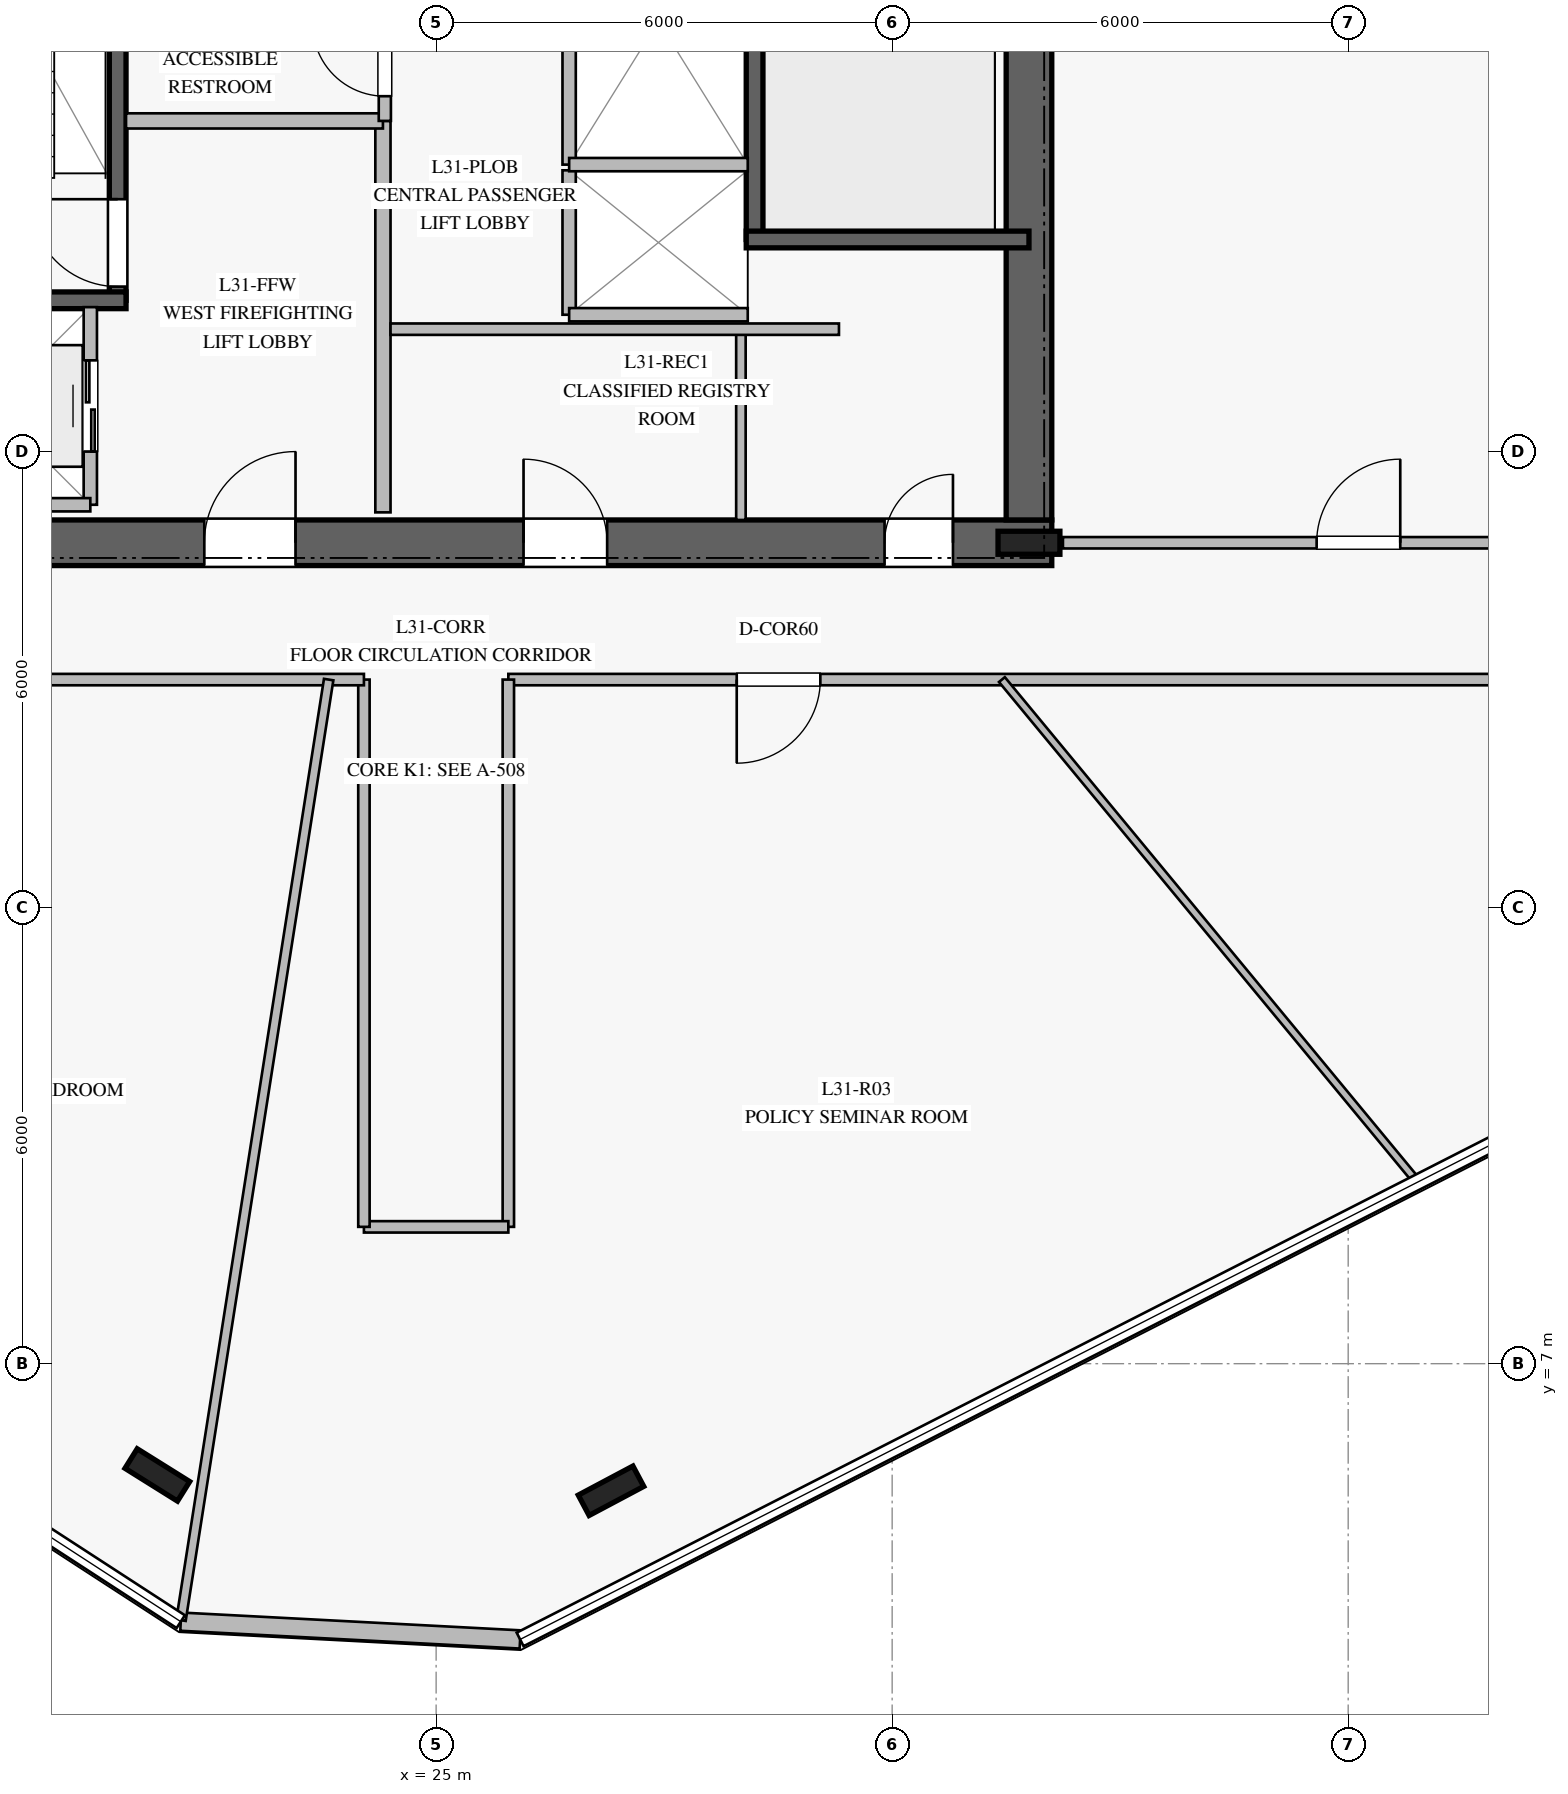
"""IFC4 building model, lengths in metres.
Left out: names, types, materials, properties, quantities, classifications, styles, units other than length and angle.
Written with IfcOpenShell. Run it as: python <this file> out.ifc"""

import sys

from ifc_helpers import new_model, si_unit, direction, frame, frame_2d, origin, origin_2d, place, context, subcontext, project, spatial, rectangle, i_section, extrude, element, fill, save


model = new_model("IFC4")
c1 = context("Model", 3, precision=1e-05, world=origin(), true_north=direction((0.0, 1.0)))
c2 = subcontext(c1, "Body", "Model", "MODEL_VIEW")
j1 = project(units=[si_unit("LENGTHUNIT", "METRE"), si_unit("PLANEANGLEUNIT", "RADIAN")], contexts=[c1])
p1 = place(None, origin())
s1 = spatial("IfcSite", under=j1, at=p1, CompositionType="ELEMENT")
p2 = place(p1, origin())
s2 = spatial("IfcBuilding", under=s1, at=p2, CompositionType="ELEMENT")
p3 = place(p2, frame((0.0, 0.0, 130.4)))
s3 = spatial("IfcBuildingStorey", under=s2, at=p3, CompositionType="ELEMENT", Elevation=130.4)
p4 = place(p3, frame((16.9, 17.8, 0.0), z_axis=(0.0, 0.0, 1.0), x_axis=(1.0, 0.0, 0.0)))
e1 = element("IfcWall", 1, at=p4, inside=s3, PredefinedType="SHEAR", context=c2, shape_type="SweptSolid", body=[
    extrude(rectangle(XDim=16.2, YDim=0.6, at=frame_2d((8.1, 0.0))), origin(), (0.0, 0.0, 1.0), 3.76),
])
p5 = place(p4, frame((5.05, 0.0, 0.0)))
e2 = element("IfcOpeningElement", 2, at=p5, cuts=e1, PredefinedType="OPENING", context=c2, shape_type="SweptSolid", body=[
    extrude(rectangle(XDim=1.2, YDim=2.25, at=frame_2d((0.6, 1.125))), frame((0.0, 0.31, 0.0), z_axis=(0.0, -1.0, 0.0), x_axis=(1.0, 0.0, 0.0)), (0.0, 0.0, 1.0), 0.62),
])
p6 = place(p4, frame((14.0, 0.0, 0.0)))
e3 = element("IfcOpeningElement", 3, at=p6, cuts=e1, PredefinedType="OPENING", context=c2, shape_type="SweptSolid", body=[
    extrude(rectangle(XDim=0.9, YDim=2.1, at=frame_2d((0.45, 1.05))), frame((0.0, 0.31, 0.0), z_axis=(0.0, -1.0, 0.0), x_axis=(1.0, 0.0, 0.0)), (0.0, 0.0, 1.0), 0.62),
])
p7 = place(p4, frame((9.25, 0.0, 0.0)))
e4 = element("IfcOpeningElement", 4, at=p7, cuts=e1, PredefinedType="OPENING", context=c2, shape_type="SweptSolid", body=[
    extrude(rectangle(XDim=1.1, YDim=2.2, at=frame_2d((0.55, 1.1))), frame((0.0, 0.31, 0.0), z_axis=(0.0, -1.0, 0.0), x_axis=(1.0, 0.0, 0.0)), (0.0, 0.0, 1.0), 0.62),
])
p8 = place(p3, frame((32.8, 18.1, 0.0), z_axis=(0.0, 0.0, 1.0), x_axis=(0.0, 1.0, 0.0)))
e5 = element("IfcWall", 5, at=p8, inside=s3, PredefinedType="SHEAR", context=c2, shape_type="SweptSolid", body=[
    extrude(rectangle(XDim=13.8, YDim=0.6, at=frame_2d((6.9, 0.0))), origin(), (0.0, 0.0, 1.0), 3.76),
])
p9 = place(p3, frame((32.8, 17.8, 0.0), z_axis=(0.0, 0.0, 1.0), x_axis=(1.0, 0.0, 0.0)))
e6 = element("IfcColumn", 6, at=p9, inside=s3, PredefinedType="COLUMN", context=c2, shape_type="SweptSolid", body=[
    extrude(i_section(OverallWidth=0.303, OverallDepth=0.814, WebThickness=0.021, FlangeThickness=0.04, at=origin_2d()), origin(), (0.0, 0.0, 1.0), 4.0),
])
p10 = place(p3, frame((20.81, 20.99, 0.0), z_axis=(0.0, 0.0, 1.0), x_axis=(0.0, 1.0, 0.0)))
e7 = element("IfcWall", 7, at=p10, inside=s3, PredefinedType="SOLIDWALL", context=c2, shape_type="SweptSolid", body=[
    extrude(rectangle(XDim=7.22, YDim=0.22, at=frame_2d((3.61, 0.0))), origin(), (0.0, 0.0, 1.0), 3.76),
])
p11 = place(p10, frame((0.18, 0.0, 0.0)))
e8 = element("IfcOpeningElement", 8, at=p11, cuts=e7, PredefinedType="OPENING", context=c2, shape_type="SweptSolid", body=[
    extrude(rectangle(XDim=1.15, YDim=2.2, at=frame_2d((0.575, 1.1))), frame((0.0, 0.12, 0.0), z_axis=(0.0, -1.0, 0.0), x_axis=(1.0, 0.0, 0.0)), (0.0, 0.0, 1.0), 0.24),
])
p12 = place(p3, frame((17.2, 20.99, 0.0), z_axis=(0.0, 0.0, 1.0), x_axis=(1.0, 0.0, 0.0)))
e9 = element("IfcWall", 9, at=p12, inside=s3, PredefinedType="SOLIDWALL", context=c2, shape_type="SweptSolid", body=[
    extrude(rectangle(XDim=3.72, YDim=0.22, at=frame_2d((1.86, 0.0))), origin(), (0.0, 0.0, 1.0), 3.76),
])
p13 = place(p3, frame((29.19, 21.79, 0.0), z_axis=(0.0, 0.0, 1.0), x_axis=(0.0, 1.0, 0.0)))
e10 = element("IfcWall", 10, at=p13, inside=s3, PredefinedType="SOLIDWALL", context=c2, shape_type="SweptSolid", body=[
    extrude(rectangle(XDim=7.22, YDim=0.22, at=frame_2d((3.61, 0.0))), origin(), (0.0, 0.0, 1.0), 3.76),
])
p14 = place(p13, frame((5.88, 0.0, 0.0)))
e11 = element("IfcOpeningElement", 11, at=p14, cuts=e10, PredefinedType="OPENING", context=c2, shape_type="SweptSolid", body=[
    extrude(rectangle(XDim=1.15, YDim=2.2, at=frame_2d((0.575, 1.1))), frame((0.0, 0.12, 0.0), z_axis=(0.0, -1.0, 0.0), x_axis=(1.0, 0.0, 0.0)), (0.0, 0.0, 1.0), 0.24),
])
p15 = place(p3, frame((29.08, 21.79, 0.0), z_axis=(0.0, 0.0, 1.0), x_axis=(1.0, 0.0, 0.0)))
e12 = element("IfcWall", 12, at=p15, inside=s3, PredefinedType="SOLIDWALL", context=c2, shape_type="SweptSolid", body=[
    extrude(rectangle(XDim=3.72, YDim=0.22, at=frame_2d((1.86, 0.0))), origin(), (0.0, 0.0, 1.0), 3.76),
])
for number, where, z_axis, x_axis in (
    (13, (21.332, 5.536, 0.0), (0.0, 0.0, 1.0), (-0.848, 0.53, 0.0)),
    (14, (27.301, 5.328, 0.0), (0.0, 0.0, 1.0), (0.883, 0.469, 0.0)),
):
    element("IfcColumn", number, at=place(p3, frame(where, z_axis=z_axis, x_axis=x_axis)), inside=s3, PredefinedType="COLUMN", context=c2, shape_type="SweptSolid", body=[
        extrude(i_section(OverallWidth=0.303, OverallDepth=0.814, WebThickness=0.021, FlangeThickness=0.04, at=origin_2d()), origin(), (0.0, 0.0, 1.0), 4.0),
    ])
p16 = place(p3, frame((21.64, 3.606, 0.0), z_axis=(0.0, 0.0, 1.0), x_axis=(0.998630920983, -0.052309498732, 0.0)))
e15 = element("IfcWall", 15, at=p16, inside=s3, PredefinedType="STANDARD", context=c2, shape_type="SweptSolid", body=[
    extrude(rectangle(XDim=4.471, YDim=0.24, at=frame_2d((2.236, 0.0))), origin(), (0.0, 0.0, 1.0), 3.76),
])
p17 = place(p3, frame((24.3, 18.2, 0.0), z_axis=(0.0, 0.0, 1.0), x_axis=(0.0, 1.0, 0.0)))
e16 = element("IfcWall", 16, at=p17, inside=s3, PredefinedType="PARTITIONING", context=c2, shape_type="SweptSolid", body=[
    extrude(rectangle(XDim=5.15, YDim=0.2, at=frame_2d((2.575, 0.0))), origin(), (0.0, 0.0, 1.0), 3.76),
])
p18 = place(p3, frame((20.92, 23.35, 0.0), z_axis=(0.0, 0.0, 1.0), x_axis=(1.0, 0.0, 0.0)))
e17 = element("IfcWall", 17, at=p18, inside=s3, PredefinedType="PARTITIONING", context=c2, shape_type="SweptSolid", body=[
    extrude(rectangle(XDim=3.38, YDim=0.2, at=frame_2d((1.69, 0.0))), origin(), (0.0, 0.0, 1.0), 3.76),
])
p19 = place(p3, frame((24.325, 23.35, 0.0), z_axis=(0.0, 0.0, 1.0), x_axis=(0.0, 1.0, 0.0)))
e18 = element("IfcWall", 18, at=p19, inside=s3, PredefinedType="PLUMBINGWALL", context=c2, shape_type="SweptSolid", body=[
    extrude(rectangle(XDim=4.93, YDim=0.16, at=frame_2d((2.465, 0.0))), origin(), (0.0, 0.0, 1.0), 3.76),
])
p20 = place(p19, frame((0.325, 0.0, 0.0)))
e19 = element("IfcOpeningElement", 19, at=p20, cuts=e18, PredefinedType="OPENING", context=c2, shape_type="SweptSolid", body=[
    extrude(rectangle(XDim=0.95, YDim=2.1, at=frame_2d((0.475, 1.05))), frame((0.0, 0.09, 0.0), z_axis=(0.0, -1.0, 0.0), x_axis=(1.0, 0.0, 0.0)), (0.0, 0.0, 1.0), 0.18),
])
p21 = place(p19, frame((1.985, 0.0, 0.0)))
e20 = element("IfcOpeningElement", 20, at=p21, cuts=e18, PredefinedType="OPENING", context=c2, shape_type="SweptSolid", body=[
    extrude(rectangle(XDim=0.9, YDim=2.1, at=frame_2d((0.45, 1.05))), frame((0.0, 0.09, 0.0), z_axis=(0.0, -1.0, 0.0), x_axis=(1.0, 0.0, 0.0)), (0.0, 0.0, 1.0), 0.18),
])
p22 = place(p19, frame((3.66, 0.0, 0.0)))
e21 = element("IfcOpeningElement", 21, at=p22, cuts=e18, PredefinedType="OPENING", context=c2, shape_type="SweptSolid", body=[
    extrude(rectangle(XDim=0.9, YDim=2.1, at=frame_2d((0.45, 1.05))), frame((0.0, 0.09, 0.0), z_axis=(0.0, -1.0, 0.0), x_axis=(1.0, 0.0, 0.0)), (0.0, 0.0, 1.0), 0.18),
])
p23 = place(p3, frame((29.01, 18.1, 0.0), z_axis=(0.0, 0.0, 1.0), x_axis=(0.0, 1.0, 0.0)))
e22 = element("IfcWall", 22, at=p23, inside=s3, PredefinedType="PARTITIONING", context=c2, shape_type="SweptSolid", body=[
    extrude(rectangle(XDim=2.45, YDim=0.125, at=frame_2d((1.225, 0.0))), origin(), (0.0, 0.0, 1.0), 3.76),
])
p24 = place(p3, frame((24.4, 20.61, 0.0), z_axis=(0.0, 0.0, 1.0), x_axis=(1.0, 0.0, 0.0)))
e23 = element("IfcWall", 23, at=p24, inside=s3, PredefinedType="PARTITIONING", context=c2, shape_type="SweptSolid", body=[
    extrude(rectangle(XDim=5.9, YDim=0.15, at=frame_2d((2.95, 0.0))), origin(), (0.0, 0.0, 1.0), 3.76),
])
p25 = place(p3, frame((26.75, 20.8, 0.0), z_axis=(0.0, 0.0, 1.0), x_axis=(0.0, 1.0, 0.0)))
e24 = element("IfcWall", 24, at=p25, inside=s3, PredefinedType="PARTITIONING", context=c2, shape_type="SweptSolid", body=[
    extrude(rectangle(XDim=1.9, YDim=0.175, at=frame_2d((0.95, 0.0))), origin(), (0.0, 0.0, 1.0), 3.76),
])
p26 = place(p3, frame((26.75, 20.8, 0.0), z_axis=(0.0, 0.0, 1.0), x_axis=(1.0, 0.0, 0.0)))
e25 = element("IfcWall", 25, at=p26, inside=s3, PredefinedType="PARTITIONING", context=c2, shape_type="SweptSolid", body=[
    extrude(rectangle(XDim=2.35, YDim=0.175, at=frame_2d((1.175, 0.0))), origin(), (0.0, 0.0, 1.0), 3.76),
])
p27 = place(p3, frame((26.75, 22.775, 0.0), z_axis=(0.0, 0.0, 1.0), x_axis=(0.0, 1.0, 0.0)))
e26 = element("IfcWall", 26, at=p27, inside=s3, PredefinedType="PARTITIONING", context=c2, shape_type="SweptSolid", body=[
    extrude(rectangle(XDim=1.9, YDim=0.175, at=frame_2d((0.95, 0.0))), origin(), (0.0, 0.0, 1.0), 3.76),
])
p28 = place(p3, frame((26.75, 22.775, 0.0), z_axis=(0.0, 0.0, 1.0), x_axis=(1.0, 0.0, 0.0)))
e27 = element("IfcWall", 27, at=p28, inside=s3, PredefinedType="PARTITIONING", context=c2, shape_type="SweptSolid", body=[
    extrude(rectangle(XDim=2.35, YDim=0.175, at=frame_2d((1.175, 0.0))), origin(), (0.0, 0.0, 1.0), 3.76),
])
p29 = place(p3, frame((20.45, 18.3, 0.0), z_axis=(0.0, 0.0, 1.0), x_axis=(0.0, 1.0, 0.0)))
e28 = element("IfcWall", 28, at=p29, inside=s3, PredefinedType="PARTITIONING", context=c2, shape_type="SweptSolid", body=[
    extrude(rectangle(XDim=2.6, YDim=0.175, at=frame_2d((1.3, 0.0))), origin(), (0.0, 0.0, 1.0), 3.76),
])
p30 = place(p29, frame((0.7, 0.0, 0.0)))
e29 = element("IfcOpeningElement", 29, at=p30, cuts=e28, PredefinedType="OPENING", context=c2, shape_type="SweptSolid", body=[
    extrude(rectangle(XDim=1.2, YDim=2.2, at=frame_2d((0.6, 1.1))), frame((0.0, 0.098, 0.0), z_axis=(0.0, -1.0, 0.0), x_axis=(1.0, 0.0, 0.0)), (0.0, 0.0, 1.0), 0.195),
])
p31 = place(p3, frame((17.85, 18.3, 0.0), z_axis=(0.0, 0.0, 1.0), x_axis=(1.0, 0.0, 0.0)))
e30 = element("IfcWall", 30, at=p31, inside=s3, PredefinedType="PARTITIONING", context=c2, shape_type="SweptSolid", body=[
    extrude(rectangle(XDim=2.6, YDim=0.175, at=frame_2d((1.3, 0.0))), origin(), (0.0, 0.0, 1.0), 3.76),
])
p32 = place(p3, frame((33.247, 17.8, 0.0), z_axis=(0.0, 0.0, 1.0), x_axis=(1.0, 0.0, 0.0)))
e31 = element("IfcWall", 31, at=p32, inside=s3, PredefinedType="PARTITIONING", context=c2, shape_type="SweptSolid", body=[
    extrude(rectangle(XDim=7.953, YDim=0.15, at=frame_2d((3.977, 0.0))), origin(), (0.0, 0.0, 1.0), 3.21),
])
p33 = place(p32, frame((3.338, 0.0, 0.0)))
e32 = element("IfcOpeningElement", 32, at=p33, cuts=e31, PredefinedType="OPENING", context=c2, shape_type="SweptSolid", body=[
    extrude(rectangle(XDim=1.1, YDim=2.2, at=frame_2d((0.55, 1.1))), frame((0.0, 0.085, 0.0), z_axis=(0.0, -1.0, 0.0), x_axis=(1.0, 0.0, 0.0)), (0.0, 0.0, 1.0), 0.17),
])
p34 = place(p3, frame((41.2, 16.0, 0.0), z_axis=(0.0, 0.0, 1.0), x_axis=(-1.0, 0.0, 0.0)))
e33 = element("IfcWall", 33, at=p34, inside=s3, PredefinedType="PARTITIONING", context=c2, shape_type="SweptSolid", body=[
    extrude(rectangle(XDim=15.25, YDim=0.15, at=frame_2d((7.625, 0.0))), origin(), (0.0, 0.0, 1.0), 3.21),
])
p35 = place(p34, frame((11.145, 0.0, 0.0)))
e34 = element("IfcOpeningElement", 34, at=p35, cuts=e33, PredefinedType="OPENING", context=c2, shape_type="SweptSolid", body=[
    extrude(rectangle(XDim=1.1, YDim=2.2, at=frame_2d((0.55, 1.1))), frame((0.0, 0.085, 0.0), z_axis=(0.0, -1.0, 0.0), x_axis=(1.0, 0.0, 0.0)), (0.0, 0.0, 1.0), 0.17),
])
p36 = place(p3, frame((25.95, 16.0, 0.0), z_axis=(0.0, 0.0, 1.0), x_axis=(0.0, -1.0, 0.0)))
e35 = element("IfcWall", 35, at=p36, inside=s3, PredefinedType="PARTITIONING", context=c2, shape_type="SweptSolid", body=[
    extrude(rectangle(XDim=7.2, YDim=0.15, at=frame_2d((3.6, 0.0))), origin(), (0.0, 0.0, 1.0), 3.36),
])
p37 = place(p3, frame((25.95, 8.8, 0.0), z_axis=(0.0, 0.0, 1.0), x_axis=(-1.0, 0.0, 0.0)))
e36 = element("IfcWall", 36, at=p37, inside=s3, PredefinedType="PARTITIONING", context=c2, shape_type="SweptSolid", body=[
    extrude(rectangle(XDim=1.9, YDim=0.15, at=frame_2d((0.95, 0.0))), origin(), (0.0, 0.0, 1.0), 3.76),
])
p38 = place(p3, frame((24.05, 8.8, 0.0), z_axis=(0.0, 0.0, 1.0), x_axis=(0.0, 1.0, 0.0)))
e37 = element("IfcWall", 37, at=p38, inside=s3, PredefinedType="PARTITIONING", context=c2, shape_type="SweptSolid", body=[
    extrude(rectangle(XDim=7.2, YDim=0.15, at=frame_2d((3.6, 0.0))), origin(), (0.0, 0.0, 1.0), 3.36),
])
p39 = place(p3, frame((24.05, 16.0, 0.0), z_axis=(0.0, 0.0, 1.0), x_axis=(-1.0, 0.0, 0.0)))
e38 = element("IfcWall", 38, at=p39, inside=s3, PredefinedType="PARTITIONING", context=c2, shape_type="SweptSolid", body=[
    extrude(rectangle(XDim=6.85, YDim=0.15, at=frame_2d((3.425, 0.0))), origin(), (0.0, 0.0, 1.0), 3.21),
])
p40 = place(p3, frame((23.586, 16.0, 0.0), z_axis=(0.0, 0.0, 1.0), x_axis=(-0.155099800777, -0.987898806457, 0.0)))
e39 = element("IfcWall", 39, at=p40, inside=s3, PredefinedType="PARTITIONING", context=c2, shape_type="SweptSolid", body=[
    extrude(rectangle(XDim=12.527, YDim=0.125, at=frame_2d((6.263, 0.0))), origin(), (0.0, 0.0, 1.0), 3.16),
])
p41 = place(p3, frame((32.444, 16.0, 0.0), z_axis=(0.0, 0.0, 1.0), x_axis=(0.637251985901, -0.770655504402, 0.0)))
e40 = element("IfcWall", 40, at=p41, inside=s3, PredefinedType="MOVABLE", context=c2, shape_type="SweptSolid", body=[
    extrude(rectangle(XDim=8.563, YDim=0.1, at=frame_2d((4.281, 0.0))), origin(), (0.0, 0.0, 1.0), 3.16),
])
p42 = place(p11, origin())
e41 = element("IfcDoor", 41, at=p42, inside=s3, OperationType="SINGLE_SWING_RIGHT", PredefinedType="DOOR", context=c2, shape_type="SweptSolid", body=[
    extrude(rectangle(XDim=1.15, YDim=2.2, at=frame_2d((0.575, 1.1))), frame((0.0, 0.025, 0.0), z_axis=(0.0, -1.0, 0.0), x_axis=(1.0, 0.0, 0.0)), (0.0, 0.0, 1.0), 0.05),
])
fill(e8, e41)
p43 = place(p5, origin())
e42 = element("IfcDoor", 42, at=p43, inside=s3, OperationType="SINGLE_SWING_RIGHT", PredefinedType="DOOR", context=c2, shape_type="SweptSolid", body=[
    extrude(rectangle(XDim=1.2, YDim=2.25, at=frame_2d((0.6, 1.125))), frame((0.0, 0.025, 0.0), z_axis=(0.0, -1.0, 0.0), x_axis=(1.0, 0.0, 0.0)), (0.0, 0.0, 1.0), 0.05),
])
fill(e2, e42)
p44 = place(p20, origin())
e43 = element("IfcDoor", 43, at=p44, inside=s3, OperationType="SINGLE_SWING_RIGHT", PredefinedType="DOOR", context=c2, shape_type="SweptSolid", body=[
    extrude(rectangle(XDim=0.95, YDim=2.1, at=frame_2d((0.475, 1.05))), frame((0.0, 0.025, 0.0), z_axis=(0.0, -1.0, 0.0), x_axis=(1.0, 0.0, 0.0)), (0.0, 0.0, 1.0), 0.05),
])
fill(e19, e43)
p45 = place(p6, origin())
e44 = element("IfcDoor", 44, at=p45, inside=s3, OperationType="SINGLE_SWING_RIGHT", PredefinedType="DOOR", context=c2, shape_type="SweptSolid", body=[
    extrude(rectangle(XDim=0.9, YDim=2.1, at=frame_2d((0.45, 1.05))), frame((0.0, 0.025, 0.0), z_axis=(0.0, -1.0, 0.0), x_axis=(1.0, 0.0, 0.0)), (0.0, 0.0, 1.0), 0.05),
])
fill(e3, e44)
p46 = place(p7, origin())
e45 = element("IfcDoor", 45, at=p46, inside=s3, OperationType="SINGLE_SWING_LEFT", PredefinedType="DOOR", context=c2, shape_type="SweptSolid", body=[
    extrude(rectangle(XDim=1.1, YDim=2.2, at=frame_2d((0.55, 1.1))), frame((0.0, 0.025, 0.0), z_axis=(0.0, -1.0, 0.0), x_axis=(1.0, 0.0, 0.0)), (0.0, 0.0, 1.0), 0.05),
])
fill(e4, e45)
p47 = place(p30, origin())
e46 = element("IfcDoor", 46, at=p47, inside=s3, OperationType="DOUBLE_DOOR_SLIDING", PredefinedType="DOOR", context=c2, shape_type="SweptSolid", body=[
    extrude(rectangle(XDim=1.2, YDim=2.2, at=frame_2d((0.6, 1.1))), frame((0.0, 0.025, 0.0), z_axis=(0.0, -1.0, 0.0), x_axis=(1.0, 0.0, 0.0)), (0.0, 0.0, 1.0), 0.05),
])
fill(e29, e46)
p48 = place(p35, origin())
e47 = element("IfcDoor", 47, at=p48, inside=s3, OperationType="SINGLE_SWING_RIGHT", PredefinedType="DOOR", context=c2, shape_type="SweptSolid", body=[
    extrude(rectangle(XDim=1.1, YDim=2.2, at=frame_2d((0.55, 1.1))), frame((0.0, 0.025, 0.0), z_axis=(0.0, -1.0, 0.0), x_axis=(1.0, 0.0, 0.0)), (0.0, 0.0, 1.0), 0.05),
])
fill(e34, e47)
p49 = place(p33, origin())
e48 = element("IfcDoor", 48, at=p49, inside=s3, OperationType="SINGLE_SWING_RIGHT", PredefinedType="DOOR", context=c2, shape_type="SweptSolid", body=[
    extrude(rectangle(XDim=1.1, YDim=2.2, at=frame_2d((0.55, 1.1))), frame((0.0, 0.025, 0.0), z_axis=(0.0, -1.0, 0.0), x_axis=(1.0, 0.0, 0.0)), (0.0, 0.0, 1.0), 0.05),
])
fill(e32, e48)
save(model, sys.argv[1])
